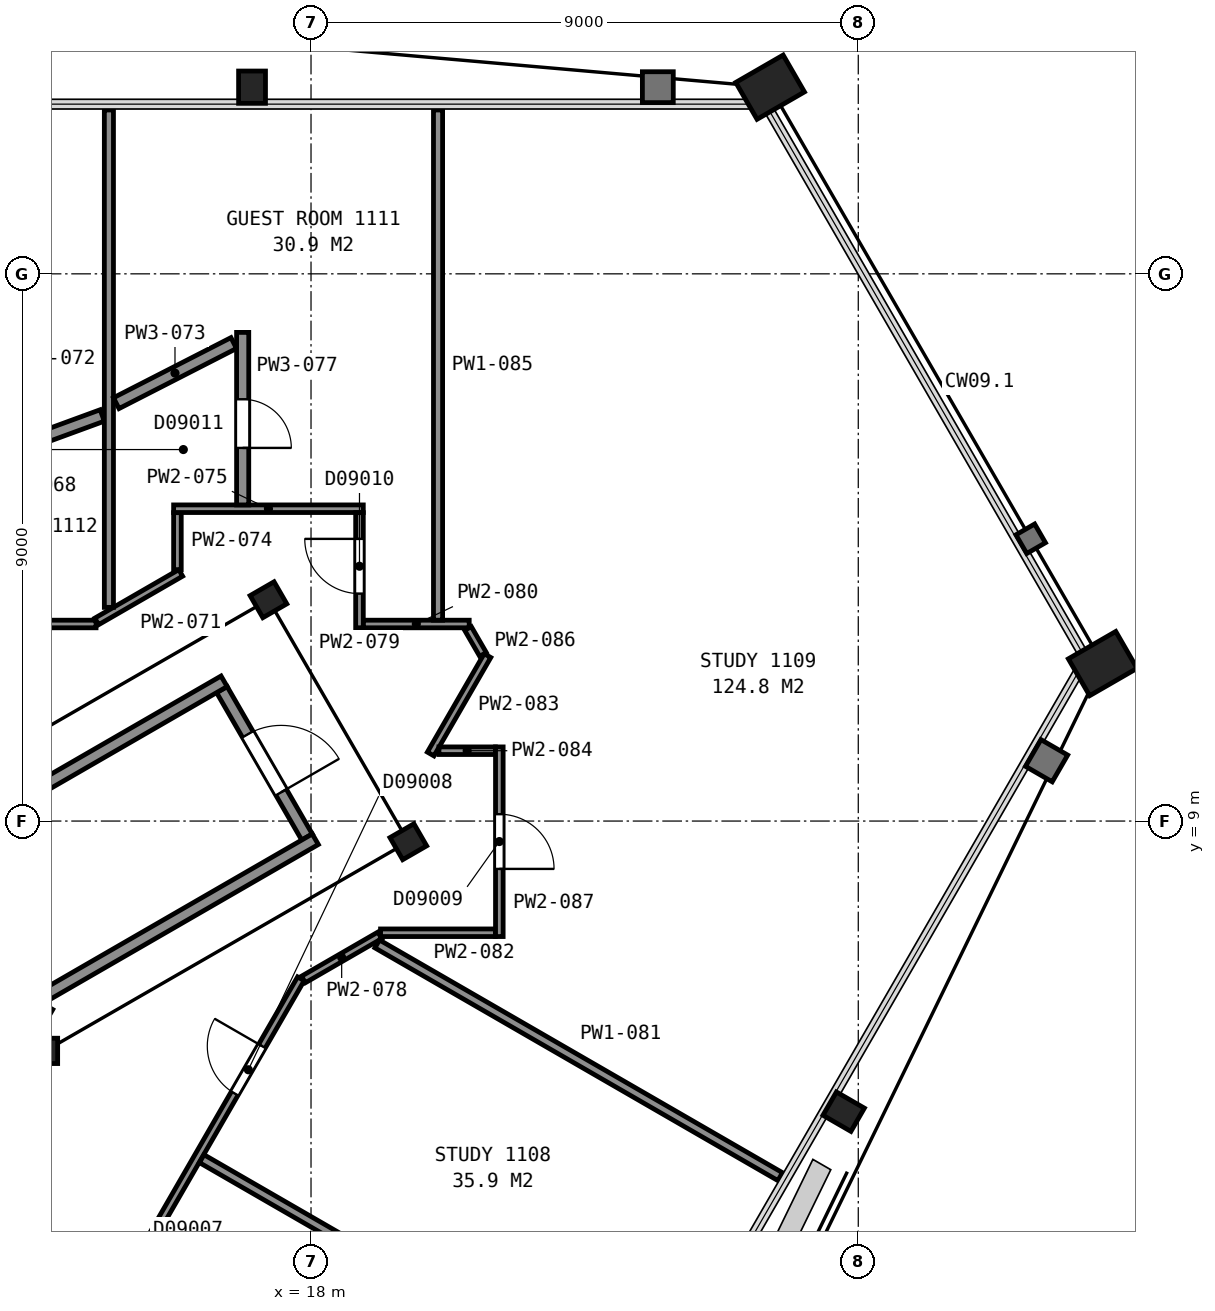
"""IFC4 building model, lengths in metres.
Left out: names, types, materials, properties, quantities, classifications, styles, units other than length and angle.
Written with IfcOpenShell. Run it as: python <this file> out.ifc"""

import sys

from ifc_helpers import new_model, si_unit, direction, frame, frame_2d, origin, origin_2d, place, context, subcontext, project, spatial, rectangle, hollow_rectangle, i_section, extrude, element, fill, save


model = new_model("IFC4")
c1 = context("Model", 3, precision=1e-05, world=origin(), true_north=direction((0.0, 1.0)))
c2 = subcontext(c1, "Body", "Model", "MODEL_VIEW")
j1 = project(units=[si_unit("LENGTHUNIT", "METRE"), si_unit("PLANEANGLEUNIT", "RADIAN")], contexts=[c1])
p1 = place(None, origin())
s1 = spatial("IfcSite", under=j1, at=p1, CompositionType="ELEMENT")
p2 = place(p1, origin())
s2 = spatial("IfcBuilding", under=s1, at=p2, CompositionType="ELEMENT")
p3 = place(p2, frame((0.0, 0.0, 54.8)))
s3 = spatial("IfcBuildingStorey", under=s2, at=p3, CompositionType="ELEMENT", Elevation=54.8)
p4 = place(p3, frame((25.55, 21.07, 0.0), z_axis=(0.0, 0.0, 1.0), x_axis=(0.5, -0.866025403784, 0.0)))
e1 = element("IfcColumn", 1, at=p4, inside=s3, PredefinedType="COLUMN", context=c2, shape_type="SweptSolid", body=[
    extrude(hollow_rectangle(XDim=0.7, YDim=0.9, WallThickness=0.065, at=origin_2d()), origin(), (0.0, 0.0, 1.0), 3.6),
])
for number, where, z_axis, x_axis in (
    (2, (17.03, 21.07, 0.0), (0.0, 0.0, 1.0), (1.0, 0.0, 0.0)),
    (3, (26.76, 4.22, 0.0), (0.0, 0.0, 1.0), (-0.5, -0.866, 0.0)),
):
    element("IfcColumn", number, at=place(p3, frame(where, z_axis=z_axis, x_axis=x_axis)), inside=s3, PredefinedType="COLUMN", context=c2, shape_type="SweptSolid", body=[
        extrude(i_section(OverallWidth=0.442, OverallDepth=0.531, WebThickness=0.066, FlangeThickness=0.106, FilletRadius=0.015, at=origin_2d()), origin(), (0.0, 0.0, 1.0), 3.6),
    ])
p5 = place(p3, frame((31.02, 11.59, 0.0), z_axis=(0.0, 0.0, 1.0), x_axis=(0.5, -0.866025403784, 0.0)))
e4 = element("IfcColumn", 4, at=p5, inside=s3, PredefinedType="COLUMN", context=c2, shape_type="SweptSolid", body=[
    extrude(hollow_rectangle(XDim=0.7, YDim=0.9, WallThickness=0.065, at=origin_2d()), origin(), (0.0, 0.0, 1.0), 3.6),
])
p6 = place(p3, frame((13.63, 5.22, 0.0), z_axis=(0.0, 0.0, 1.0), x_axis=(1.0, 0.0, 0.0)))
e5 = element("IfcColumn", 5, at=p6, inside=s3, PredefinedType="COLUMN", context=c2, shape_type="SweptSolid", body=[
    extrude(i_section(OverallWidth=0.406, OverallDepth=0.417, WebThickness=0.03, FlangeThickness=0.048, FilletRadius=0.015, at=origin_2d()), origin(), (0.0, 0.0, 1.0), 3.6),
])
for number, where, z_axis, x_axis in (
    (6, (19.6, 8.66, 0.0), (0.0, 0.0, 1.0), (0.5, -0.866, 0.0)),
    (7, (17.3, 12.64, 0.0), (0.0, 0.0, 1.0), (0.5, -0.866, 0.0)),
):
    element("IfcColumn", number, at=place(p3, frame(where, z_axis=z_axis, x_axis=x_axis)), inside=s3, PredefinedType="COLUMN", context=c2, shape_type="SweptSolid", body=[
        extrude(i_section(OverallWidth=0.419, OverallDepth=0.455, WebThickness=0.042, FlangeThickness=0.068, FilletRadius=0.015, at=origin_2d()), origin(), (0.0, 0.0, 1.0), 3.6),
    ])
p7 = place(p3, frame((17.934, 8.738, 0.0), z_axis=(0.0, 0.0, 1.0), x_axis=(-0.49998411664, 0.866034573852, 0.0)))
e8 = element("IfcWall", 8, at=p7, inside=s3, PredefinedType="PARTITIONING", context=c2, shape_type="SweptSolid", body=[
    extrude(rectangle(XDim=2.8, YDim=0.2, at=frame_2d((1.4, 0.0))), origin(), (0.0, 0.0, 1.0), 3.35),
])
p8 = place(p7, frame((0.85, 0.0, 0.0)))
e9 = element("IfcOpeningElement", 9, at=p8, cuts=e8, PredefinedType="OPENING", context=c2, shape_type="SweptSolid", body=[
    extrude(rectangle(XDim=1.1, YDim=2.1, at=frame_2d((0.55, 1.05))), frame((0.0, 0.11, 0.0), z_axis=(0.0, -1.0, 0.0), x_axis=(1.0, 0.0, 0.0)), (0.0, 0.0, 1.0), 0.22),
])
for number, where, z_axis, x_axis in (
    (10, (6.178, 5.299, 0.0), (0.0, 0.0, 1.0), (0.866, 0.5, 0.0)),
    (11, (7.678, 2.701, 0.0), (0.0, 0.0, 1.0), (0.866, 0.5, 0.0)),
):
    element("IfcWall", number, at=place(p3, frame(where, z_axis=z_axis, x_axis=x_axis)), inside=s3, PredefinedType="PARTITIONING", context=c2, shape_type="SweptSolid", body=[
        extrude(rectangle(XDim=12.0, YDim=0.2, at=frame_2d((6.0, 0.0))), origin(), (0.0, 0.0, 1.0), 3.35),
    ])
p9 = place(p3, frame((8.492, -3.012, 0.0), z_axis=(0.0, 0.0, 1.0), x_axis=(0.499972957231, 0.866041016371, 0.0)))
e12 = element("IfcWall", 12, at=p9, inside=s3, PredefinedType="PARTITIONING", context=c2, shape_type="SweptSolid", body=[
    extrude(rectangle(XDim=10.349, YDim=0.2, at=frame_2d((5.174, 0.0))), origin(), (0.0, 0.0, 1.0), 3.35),
])
p10 = place(p3, frame((-14.465, 12.241, 0.0), z_axis=(0.0, 0.0, 1.0), x_axis=(1.0, 0.0, 0.0)))
e13 = element("IfcWall", 13, at=p10, inside=s3, PredefinedType="PARTITIONING", context=c2, shape_type="SweptSolid", body=[
    extrude(rectangle(XDim=28.929, YDim=0.125, at=frame_2d((14.465, 0.0))), origin(), (0.0, 0.0, 1.0), 2.613),
])
p11 = place(p10, frame((25.252, 0.0, 0.0)))
e14 = element("IfcOpeningElement", 14, at=p11, cuts=e13, PredefinedType="OPENING", context=c2, shape_type="SweptSolid", body=[
    extrude(rectangle(XDim=0.9, YDim=2.1, at=frame_2d((0.45, 1.05))), frame((0.0, 0.073, 0.0), z_axis=(0.0, -1.0, 0.0), x_axis=(1.0, 0.0, 0.0)), (0.0, 0.0, 1.0), 0.145),
])
p12 = place(p10, frame((22.564, 0.0, 0.0)))
e15 = element("IfcOpeningElement", 15, at=p12, cuts=e13, PredefinedType="OPENING", context=c2, shape_type="SweptSolid", body=[
    extrude(rectangle(XDim=0.9, YDim=2.1, at=frame_2d((0.45, 1.05))), frame((0.0, 0.073, 0.0), z_axis=(0.0, -1.0, 0.0), x_axis=(1.0, 0.0, 0.0)), (0.0, 0.0, 1.0), 0.145),
])
p13 = place(p10, frame((15.302, 0.0, 0.0)))
e16 = element("IfcOpeningElement", 16, at=p13, cuts=e13, PredefinedType="OPENING", context=c2, shape_type="SweptSolid", body=[
    extrude(rectangle(XDim=0.9, YDim=2.1, at=frame_2d((0.45, 1.05))), frame((0.0, 0.073, 0.0), z_axis=(0.0, -1.0, 0.0), x_axis=(1.0, 0.0, 0.0)), (0.0, 0.0, 1.0), 0.145),
])
p14 = place(p10, frame((12.365, 0.0, 0.0)))
e17 = element("IfcOpeningElement", 17, at=p14, cuts=e13, PredefinedType="OPENING", context=c2, shape_type="SweptSolid", body=[
    extrude(rectangle(XDim=0.9, YDim=2.1, at=frame_2d((0.45, 1.05))), frame((0.0, 0.073, 0.0), z_axis=(0.0, -1.0, 0.0), x_axis=(1.0, 0.0, 0.0)), (0.0, 0.0, 1.0), 0.145),
])
p15 = place(p10, frame((5.477, 0.0, 0.0)))
e18 = element("IfcOpeningElement", 18, at=p15, cuts=e13, PredefinedType="OPENING", context=c2, shape_type="SweptSolid", body=[
    extrude(rectangle(XDim=0.9, YDim=2.1, at=frame_2d((0.45, 1.05))), frame((0.0, 0.073, 0.0), z_axis=(0.0, -1.0, 0.0), x_axis=(1.0, 0.0, 0.0)), (0.0, 0.0, 1.0), 0.145),
])
p16 = place(p10, frame((2.789, 0.0, 0.0)))
e19 = element("IfcOpeningElement", 19, at=p16, cuts=e13, PredefinedType="OPENING", context=c2, shape_type="SweptSolid", body=[
    extrude(rectangle(XDim=0.9, YDim=2.1, at=frame_2d((0.45, 1.05))), frame((0.0, 0.073, 0.0), z_axis=(0.0, -1.0, 0.0), x_axis=(1.0, 0.0, 0.0)), (0.0, 0.0, 1.0), 0.145),
])
p17 = place(p3, frame((17.833, 6.406, 0.0), z_axis=(0.0, 0.0, 1.0), x_axis=(-0.500002884005, -0.866023738697, 0.0)))
e20 = element("IfcWall", 20, at=p17, inside=s3, PredefinedType="PARTITIONING", context=c2, shape_type="SweptSolid", body=[
    extrude(rectangle(XDim=28.135, YDim=0.125, at=frame_2d((14.067, 0.0))), origin(), (0.0, 0.0, 1.0), 2.613),
])
p18 = place(p17, frame((26.522, 0.0, 0.0)))
e21 = element("IfcOpeningElement", 21, at=p18, cuts=e20, PredefinedType="OPENING", context=c2, shape_type="SweptSolid", body=[
    extrude(rectangle(XDim=0.9, YDim=2.1, at=frame_2d((0.45, 1.05))), frame((0.0, 0.073, 0.0), z_axis=(0.0, -1.0, 0.0), x_axis=(1.0, 0.0, 0.0)), (0.0, 0.0, 1.0), 0.145),
])
p19 = place(p17, frame((23.184, 0.0, 0.0)))
e22 = element("IfcOpeningElement", 22, at=p19, cuts=e20, PredefinedType="OPENING", context=c2, shape_type="SweptSolid", body=[
    extrude(rectangle(XDim=0.9, YDim=2.1, at=frame_2d((0.45, 1.05))), frame((0.0, 0.073, 0.0), z_axis=(0.0, -1.0, 0.0), x_axis=(1.0, 0.0, 0.0)), (0.0, 0.0, 1.0), 0.145),
])
p20 = place(p17, frame((18.683, 0.0, 0.0)))
e23 = element("IfcOpeningElement", 23, at=p20, cuts=e20, PredefinedType="OPENING", context=c2, shape_type="SweptSolid", body=[
    extrude(rectangle(XDim=0.9, YDim=2.1, at=frame_2d((0.45, 1.05))), frame((0.0, 0.073, 0.0), z_axis=(0.0, -1.0, 0.0), x_axis=(1.0, 0.0, 0.0)), (0.0, 0.0, 1.0), 0.145),
])
p21 = place(p17, frame((14.182, 0.0, 0.0)))
e24 = element("IfcOpeningElement", 24, at=p21, cuts=e20, PredefinedType="OPENING", context=c2, shape_type="SweptSolid", body=[
    extrude(rectangle(XDim=0.9, YDim=2.1, at=frame_2d((0.45, 1.05))), frame((0.0, 0.073, 0.0), z_axis=(0.0, -1.0, 0.0), x_axis=(1.0, 0.0, 0.0)), (0.0, 0.0, 1.0), 0.145),
])
p22 = place(p17, frame((9.681, 0.0, 0.0)))
e25 = element("IfcOpeningElement", 25, at=p22, cuts=e20, PredefinedType="OPENING", context=c2, shape_type="SweptSolid", body=[
    extrude(rectangle(XDim=0.9, YDim=2.1, at=frame_2d((0.45, 1.05))), frame((0.0, 0.073, 0.0), z_axis=(0.0, -1.0, 0.0), x_axis=(1.0, 0.0, 0.0)), (0.0, 0.0, 1.0), 0.145),
])
p23 = place(p17, frame((5.18, 0.0, 0.0)))
e26 = element("IfcOpeningElement", 26, at=p23, cuts=e20, PredefinedType="OPENING", context=c2, shape_type="SweptSolid", body=[
    extrude(rectangle(XDim=0.9, YDim=2.1, at=frame_2d((0.45, 1.05))), frame((0.0, 0.073, 0.0), z_axis=(0.0, -1.0, 0.0), x_axis=(1.0, 0.0, 0.0)), (0.0, 0.0, 1.0), 0.145),
])
p24 = place(p17, frame((1.278, 0.0, 0.0)))
e27 = element("IfcOpeningElement", 27, at=p24, cuts=e20, PredefinedType="OPENING", context=c2, shape_type="SweptSolid", body=[
    extrude(rectangle(XDim=0.9, YDim=2.1, at=frame_2d((0.45, 1.05))), frame((0.0, 0.073, 0.0), z_axis=(0.0, -1.0, 0.0), x_axis=(1.0, 0.0, 0.0)), (0.0, 0.0, 1.0), 0.145),
])
p25 = place(p3, frame((12.698, 14.986, 0.0), z_axis=(0.0, 0.0, 1.0), x_axis=(0.938894816734, 0.344204188105, 0.0)))
e28 = element("IfcWall", 28, at=p25, inside=s3, PredefinedType="PARTITIONING", context=c2, shape_type="SweptSolid", body=[
    extrude(rectangle(XDim=1.99, YDim=0.2, at=frame_2d((0.995, 0.0))), origin(), (0.0, 0.0, 1.0), 2.613),
])
p26 = place(p3, frame((14.476, 12.283, 0.0), z_axis=(0.0, 0.0, 1.0), x_axis=(0.865974057503, 0.500088923824, 0.0)))
e29 = element("IfcWall", 29, at=p26, inside=s3, PredefinedType="PARTITIONING", context=c2, shape_type="SweptSolid", body=[
    extrude(rectangle(XDim=1.595, YDim=0.125, at=frame_2d((0.798, 0.0))), origin(), (0.0, 0.0, 1.0), 2.613),
])
p27 = place(p3, frame((14.676, 12.514, 0.0), z_axis=(0.0, 0.0, 1.0), x_axis=(0.0, 1.0, 0.0)))
e30 = element("IfcWall", 30, at=p27, inside=s3, PredefinedType="PARTITIONING", context=c2, shape_type="SweptSolid", body=[
    extrude(rectangle(XDim=8.181, YDim=0.15, at=frame_2d((4.09, 0.0))), origin(), (0.0, 0.0, 1.0), 2.613),
])
p28 = place(p3, frame((14.797, 15.873, 0.0), z_axis=(0.0, 0.0, 1.0), x_axis=(0.890181338078, 0.455606392995, 0.0)))
e31 = element("IfcWall", 31, at=p28, inside=s3, PredefinedType="PARTITIONING", context=c2, shape_type="SweptSolid", body=[
    extrude(rectangle(XDim=2.171, YDim=0.2, at=frame_2d((1.085, 0.0))), origin(), (0.0, 0.0, 1.0), 2.613),
])
p29 = place(p3, frame((15.803, 13.135, 0.0), z_axis=(0.0, 0.0, 1.0), x_axis=(0.0, 1.0, 0.0)))
e32 = element("IfcWall", 32, at=p29, inside=s3, PredefinedType="PARTITIONING", context=c2, shape_type="SweptSolid", body=[
    extrude(rectangle(XDim=0.937, YDim=0.125, at=frame_2d((0.469, 0.0))), origin(), (0.0, 0.0, 1.0), 2.613),
])
p30 = place(p3, frame((15.74, 14.137, 0.0), z_axis=(0.0, 0.0, 1.0), x_axis=(1.0, 0.0, 0.0)))
e33 = element("IfcWall", 33, at=p30, inside=s3, PredefinedType="PARTITIONING", context=c2, shape_type="SweptSolid", body=[
    extrude(rectangle(XDim=3.119, YDim=0.125, at=frame_2d((1.56, 0.0))), origin(), (0.0, 0.0, 1.0), 2.613),
])
p31 = place(p3, frame((16.202, 3.447, 0.0), z_axis=(0.0, 0.0, 1.0), x_axis=(0.866047434595, -0.499961839574, 0.0)))
e34 = element("IfcWall", 34, at=p31, inside=s3, PredefinedType="PARTITIONING", context=c2, shape_type="SweptSolid", body=[
    extrude(rectangle(XDim=8.387, YDim=0.15, at=frame_2d((4.193, 0.0))), origin(), (0.0, 0.0, 1.0), 2.613),
])
p32 = place(p3, frame((16.876, 14.199, 0.0), z_axis=(0.0, 0.0, 1.0), x_axis=(0.0, 1.0, 0.0)))
e35 = element("IfcWall", 35, at=p32, inside=s3, PredefinedType="PARTITIONING", context=c2, shape_type="SweptSolid", body=[
    extrude(rectangle(XDim=2.838, YDim=0.2, at=frame_2d((1.419, 0.0))), origin(), (0.0, 0.0, 1.0), 2.613),
])
p33 = place(p32, frame((0.938, 0.0, 0.0)))
e36 = element("IfcOpeningElement", 36, at=p33, cuts=e35, PredefinedType="OPENING", context=c2, shape_type="SweptSolid", body=[
    extrude(rectangle(XDim=0.8, YDim=2.1, at=frame_2d((0.4, 1.05))), frame((0.0, 0.11, 0.0), z_axis=(0.0, -1.0, 0.0), x_axis=(1.0, 0.0, 0.0)), (0.0, 0.0, 1.0), 0.22),
])
p34 = place(p3, frame((17.875, 6.395, 0.0), z_axis=(0.0, 0.0, 1.0), x_axis=(0.865894215669, 0.500227155672, 0.0)))
e37 = element("IfcWall", 37, at=p34, inside=s3, PredefinedType="PARTITIONING", context=c2, shape_type="SweptSolid", body=[
    extrude(rectangle(XDim=1.451, YDim=0.125, at=frame_2d((0.726, 0.0))), origin(), (0.0, 0.0, 1.0), 2.613),
])
p35 = place(p3, frame((18.797, 14.072, 0.0), z_axis=(0.0, 0.0, 1.0), x_axis=(0.0, -1.0, 0.0)))
e38 = element("IfcWall", 38, at=p35, inside=s3, PredefinedType="PARTITIONING", context=c2, shape_type="SweptSolid", body=[
    extrude(rectangle(XDim=1.894, YDim=0.125, at=frame_2d((0.947, 0.0))), origin(), (0.0, 0.0, 1.0), 2.613),
])
p36 = place(p35, frame((0.431, 0.0, 0.0)))
e39 = element("IfcOpeningElement", 39, at=p36, cuts=e38, PredefinedType="OPENING", context=c2, shape_type="SweptSolid", body=[
    extrude(rectangle(XDim=0.9, YDim=2.1, at=frame_2d((0.45, 1.05))), frame((0.0, 0.073, 0.0), z_axis=(0.0, -1.0, 0.0), x_axis=(1.0, 0.0, 0.0)), (0.0, 0.0, 1.0), 0.145),
])
p37 = place(p3, frame((18.862, 12.241, 0.0), z_axis=(0.0, 0.0, 1.0), x_axis=(1.0, 0.0, 0.0)))
e40 = element("IfcWall", 40, at=p37, inside=s3, PredefinedType="PARTITIONING", context=c2, shape_type="SweptSolid", body=[
    extrude(rectangle(XDim=1.74, YDim=0.125, at=frame_2d((0.87, 0.0))), origin(), (0.0, 0.0, 1.0), 2.613),
])
p38 = place(p3, frame((19.088, 6.979, 0.0), z_axis=(0.0, 0.0, 1.0), x_axis=(0.865990629129, -0.500060226633, 0.0)))
e41 = element("IfcWall", 41, at=p38, inside=s3, PredefinedType="PARTITIONING", context=c2, shape_type="SweptSolid", body=[
    extrude(rectangle(XDim=7.654, YDim=0.15, at=frame_2d((3.827, 0.0))), origin(), (0.0, 0.0, 1.0), 2.613),
])
p39 = place(p3, frame((19.144, 7.163, 0.0), z_axis=(0.0, 0.0, 1.0), x_axis=(1.0, 0.0, 0.0)))
e42 = element("IfcWall", 42, at=p39, inside=s3, PredefinedType="PARTITIONING", context=c2, shape_type="SweptSolid", body=[
    extrude(rectangle(XDim=1.888, YDim=0.125, at=frame_2d((0.944, 0.0))), origin(), (0.0, 0.0, 1.0), 2.613),
])
p40 = place(p3, frame((19.968, 10.103, 0.0), z_axis=(0.0, 0.0, 1.0), x_axis=(0.500072997275, 0.865983254686, 0.0)))
e43 = element("IfcWall", 43, at=p40, inside=s3, PredefinedType="PARTITIONING", context=c2, shape_type="SweptSolid", body=[
    extrude(rectangle(XDim=1.869, YDim=0.125, at=frame_2d((0.935, 0.0))), origin(), (0.0, 0.0, 1.0), 2.613),
])
p41 = place(p3, frame((20.104, 10.157, 0.0), z_axis=(0.0, 0.0, 1.0), x_axis=(1.0, 0.0, 0.0)))
e44 = element("IfcWall", 44, at=p41, inside=s3, PredefinedType="PARTITIONING", context=c2, shape_type="SweptSolid", body=[
    extrude(rectangle(XDim=0.928, YDim=0.125, at=frame_2d((0.464, 0.0))), origin(), (0.0, 0.0, 1.0), 2.613),
])
p42 = place(p3, frame((20.089, 12.303, 0.0), z_axis=(0.0, 0.0, 1.0), x_axis=(0.0, 1.0, 0.0)))
e45 = element("IfcWall", 45, at=p42, inside=s3, PredefinedType="PARTITIONING", context=c2, shape_type="SweptSolid", body=[
    extrude(rectangle(XDim=8.392, YDim=0.15, at=frame_2d((4.196, 0.0))), origin(), (0.0, 0.0, 1.0), 2.613),
])
p43 = place(p3, frame((20.582, 12.167, 0.0), z_axis=(0.0, 0.0, 1.0), x_axis=(0.500450775723, -0.86576499183, 0.0)))
e46 = element("IfcWall", 46, at=p43, inside=s3, PredefinedType="PARTITIONING", context=c2, shape_type="SweptSolid", body=[
    extrude(rectangle(XDim=0.493, YDim=0.125, at=frame_2d((0.247, 0.0))), origin(), (0.0, 0.0, 1.0), 2.613),
])
p44 = place(p3, frame((21.097, 10.219, 0.0), z_axis=(0.0, 0.0, 1.0), x_axis=(0.0, -1.0, 0.0)))
e47 = element("IfcWall", 47, at=p44, inside=s3, PredefinedType="PARTITIONING", context=c2, shape_type="SweptSolid", body=[
    extrude(rectangle(XDim=3.119, YDim=0.125, at=frame_2d((1.56, 0.0))), origin(), (0.0, 0.0, 1.0), 2.613),
])
p45 = place(p44, frame((1.106, 0.0, 0.0)))
e48 = element("IfcOpeningElement", 48, at=p45, cuts=e47, PredefinedType="OPENING", context=c2, shape_type="SweptSolid", body=[
    extrude(rectangle(XDim=0.9, YDim=2.1, at=frame_2d((0.45, 1.05))), frame((0.0, 0.073, 0.0), z_axis=(0.0, -1.0, 0.0), x_axis=(1.0, 0.0, 0.0)), (0.0, 0.0, 1.0), 0.145),
])
p46 = place(p8, origin())
e49 = element("IfcDoor", 49, at=p46, inside=s3, OperationType="SINGLE_SWING_LEFT", PredefinedType="DOOR", context=c2, shape_type="SweptSolid", body=[
    extrude(rectangle(XDim=1.1, YDim=2.1, at=frame_2d((0.55, 1.05))), frame((0.0, 0.025, 0.0), z_axis=(0.0, -1.0, 0.0), x_axis=(1.0, 0.0, 0.0)), (0.0, 0.0, 1.0), 0.05),
])
fill(e9, e49)
p47 = place(p24, origin())
e50 = element("IfcDoor", 50, at=p47, inside=s3, OperationType="SINGLE_SWING_LEFT", PredefinedType="DOOR", context=c2, shape_type="SweptSolid", body=[
    extrude(rectangle(XDim=0.9, YDim=2.1, at=frame_2d((0.45, 1.05))), frame((0.0, 0.025, 0.0), z_axis=(0.0, -1.0, 0.0), x_axis=(1.0, 0.0, 0.0)), (0.0, 0.0, 1.0), 0.05),
])
fill(e27, e50)
p48 = place(p33, origin())
e51 = element("IfcDoor", 51, at=p48, inside=s3, OperationType="SINGLE_SWING_LEFT", PredefinedType="DOOR", context=c2, shape_type="SweptSolid", body=[
    extrude(rectangle(XDim=0.8, YDim=2.1, at=frame_2d((0.4, 1.05))), frame((0.0, 0.025, 0.0), z_axis=(0.0, -1.0, 0.0), x_axis=(1.0, 0.0, 0.0)), (0.0, 0.0, 1.0), 0.05),
])
fill(e36, e51)
p49 = place(p36, origin())
e52 = element("IfcDoor", 52, at=p49, inside=s3, OperationType="SINGLE_SWING_LEFT", PredefinedType="DOOR", context=c2, shape_type="SweptSolid", body=[
    extrude(rectangle(XDim=0.9, YDim=2.1, at=frame_2d((0.45, 1.05))), frame((0.0, 0.025, 0.0), z_axis=(0.0, -1.0, 0.0), x_axis=(1.0, 0.0, 0.0)), (0.0, 0.0, 1.0), 0.05),
])
fill(e39, e52)
p50 = place(p45, origin())
e53 = element("IfcDoor", 53, at=p50, inside=s3, OperationType="SINGLE_SWING_RIGHT", PredefinedType="DOOR", context=c2, shape_type="SweptSolid", body=[
    extrude(rectangle(XDim=0.9, YDim=2.1, at=frame_2d((0.45, 1.05))), frame((0.0, 0.025, 0.0), z_axis=(0.0, -1.0, 0.0), x_axis=(1.0, 0.0, 0.0)), (0.0, 0.0, 1.0), 0.05),
])
fill(e48, e53)
save(model, sys.argv[1])
